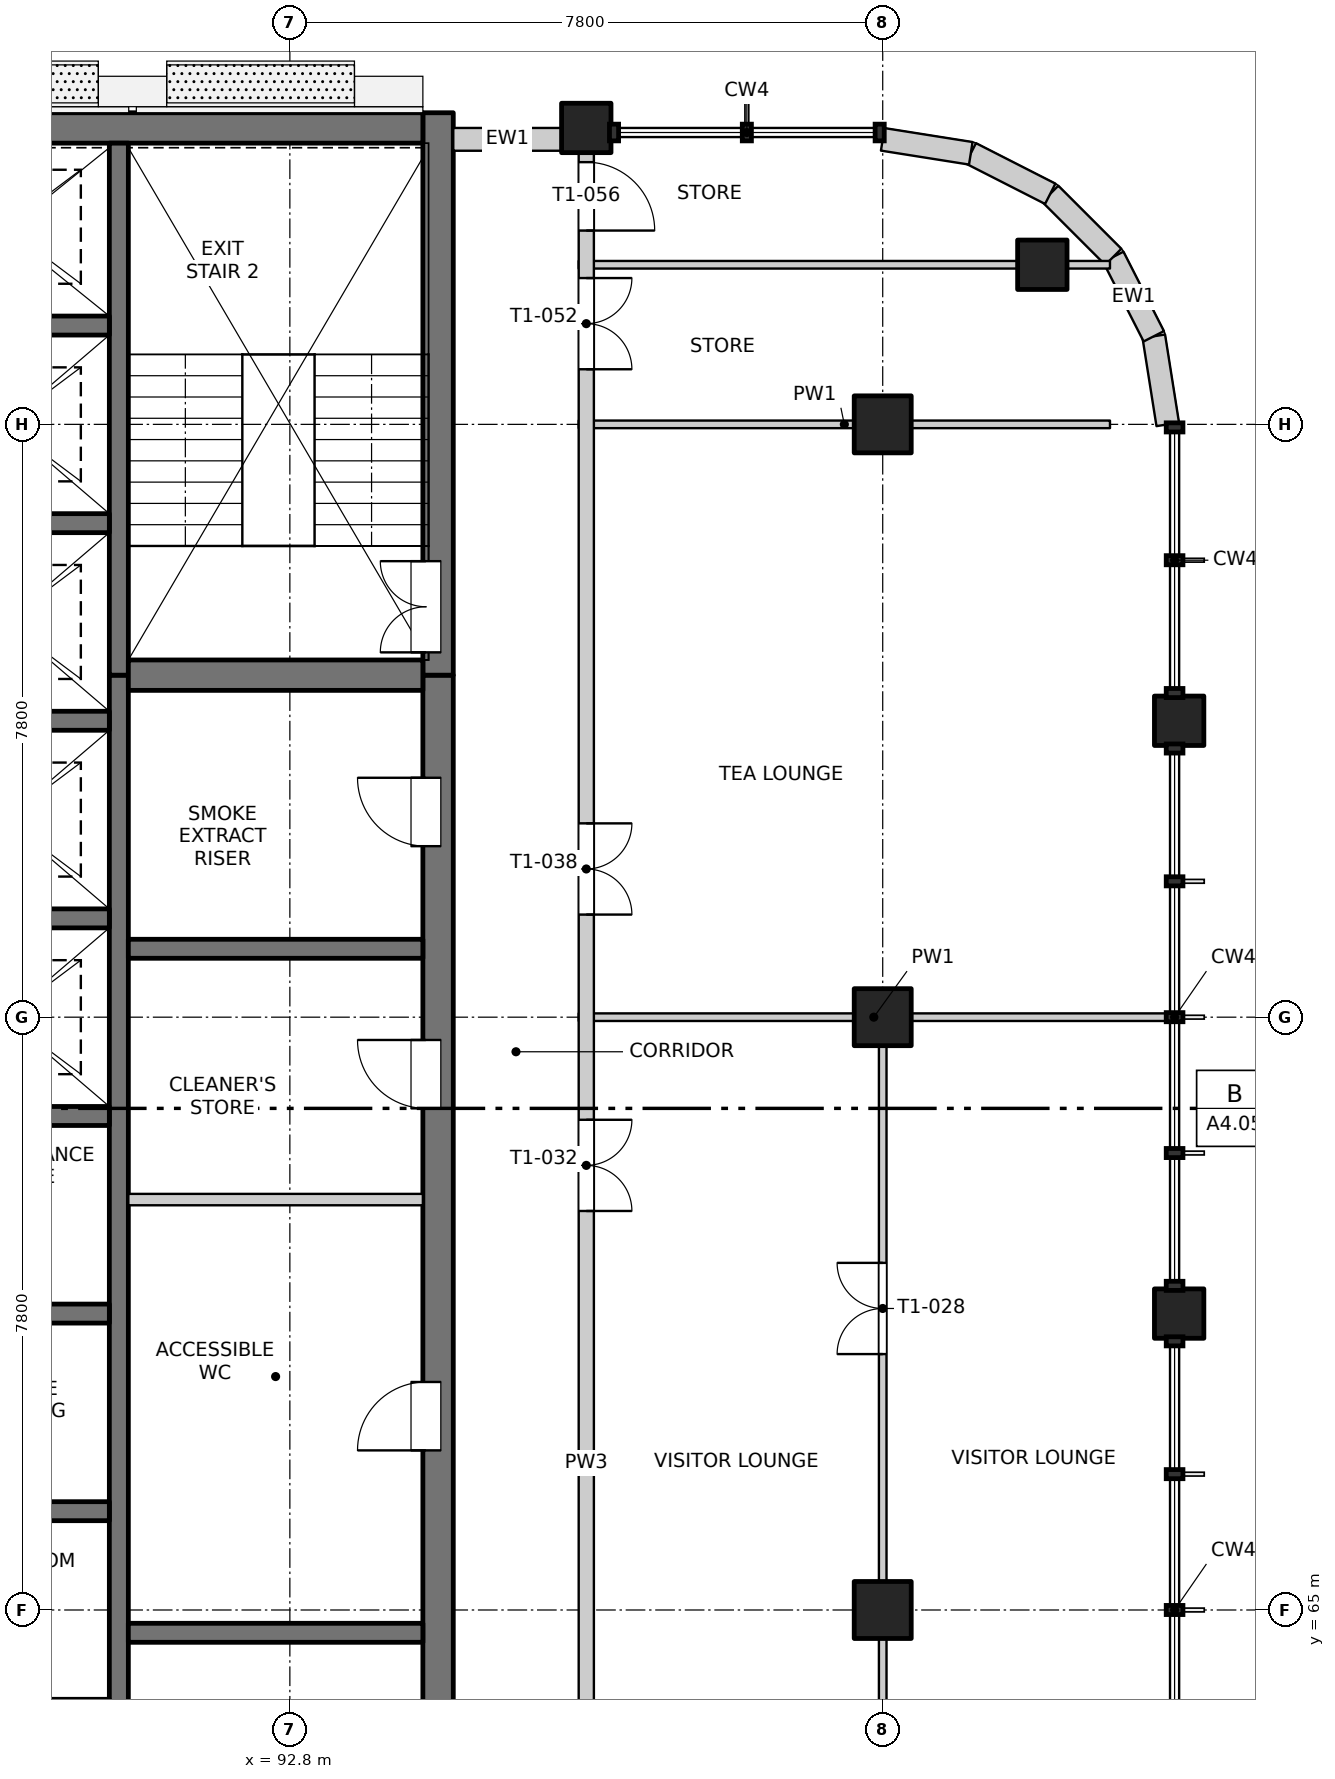
"""IFC4 building model, lengths in metres.
Left out: names, types, materials, properties, quantities, classifications, styles, units other than length and angle.
Written with IfcOpenShell. Run it as: python <this file> out.ifc"""

import sys

from ifc_helpers import new_model, si_unit, direction, frame, frame_2d, origin, origin_2d, place, context, subcontext, project, spatial, rectangle, extrude, element, fill, save


model = new_model("IFC4")
c1 = context("Model", 3, precision=1e-05, world=origin(), true_north=direction((0.0, 1.0)))
c2 = subcontext(c1, "Body", "Model", "MODEL_VIEW")
j1 = project(units=[si_unit("LENGTHUNIT", "METRE"), si_unit("PLANEANGLEUNIT", "RADIAN")], contexts=[c1])
p1 = place(None, origin())
s1 = spatial("IfcSite", under=j1, at=p1, CompositionType="ELEMENT")
p2 = place(p1, origin())
s2 = spatial("IfcBuilding", under=s1, at=p2, CompositionType="ELEMENT")
p3 = place(p2, frame((0.0, 0.0, 263.0)))
s3 = spatial("IfcBuildingStorey", under=s2, at=p3, CompositionType="ELEMENT", Elevation=263.0)
for number, where, z_axis, x_axis in (
    (1, (102.7, 82.7, -0.25), (0.0, 0.0, 1.0), (1.0, 0.0, 0.0)),
    (2, (104.5, 68.9, -0.25), (0.0, 0.0, 1.0), (1.0, 0.0, 0.0)),
    (3, (104.5, 76.7, -0.25), (0.0, 0.0, 1.0), (1.0, 0.0, 0.0)),
    (4, (96.7, 84.5, -0.25), (0.0, 0.0, 1.0), (1.0, 0.0, 0.0)),
):
    element("IfcColumn", number, at=place(p3, frame(where, z_axis=z_axis, x_axis=x_axis)), inside=s3, PredefinedType="COLUMN", context=c2, shape_type="SweptSolid", body=[
        extrude(rectangle(XDim=0.65, YDim=0.65, at=origin_2d()), origin(), (0.0, 0.0, 1.0), 3.35),
    ])
for number, where, z_axis, x_axis in (
    (5, (100.6, 65.0, -0.25), (0.0, 0.0, 1.0), (1.0, 0.0, 0.0)),
    (6, (100.6, 72.8, -0.25), (0.0, 0.0, 1.0), (1.0, 0.0, 0.0)),
    (7, (100.6, 80.6, -0.25), (0.0, 0.0, 1.0), (1.0, 0.0, 0.0)),
):
    element("IfcColumn", number, at=place(p3, frame(where, z_axis=z_axis, x_axis=x_axis)), inside=s3, PredefinedType="COLUMN", context=c2, shape_type="SweptSolid", body=[
        extrude(rectangle(XDim=0.75, YDim=0.75, at=origin_2d()), origin(), (0.0, 0.0, 1.0), 3.35),
    ])
p4 = place(p3, frame((94.75, 61.95, -0.25), z_axis=(0.0, 0.0, 1.0), x_axis=(0.0, 1.0, 0.0)))
e8 = element("IfcWall", 8, at=p4, inside=s3, PredefinedType="SOLIDWALL", context=c2, shape_type="SweptSolid", body=[
    extrude(rectangle(XDim=15.35, YDim=0.4, at=frame_2d((7.675, 0.0))), origin(), (0.0, 0.0, 1.0), 3.35),
])
p5 = place(p4, frame((0.925, 0.0, 0.25)))
e9 = element("IfcOpeningElement", 9, at=p5, cuts=e8, PredefinedType="OPENING", context=c2, shape_type="SweptSolid", body=[
    extrude(rectangle(XDim=0.9, YDim=2.1, at=frame_2d((0.45, 1.05))), frame((0.0, 0.21, 0.0), z_axis=(0.0, -1.0, 0.0), x_axis=(1.0, 0.0, 0.0)), (0.0, 0.0, 1.0), 0.42),
])
p6 = place(p4, frame((5.15, 0.0, 0.25)))
e10 = element("IfcOpeningElement", 10, at=p6, cuts=e8, PredefinedType="OPENING", context=c2, shape_type="SweptSolid", body=[
    extrude(rectangle(XDim=0.9, YDim=2.1, at=frame_2d((0.45, 1.05))), frame((0.0, 0.21, 0.0), z_axis=(0.0, -1.0, 0.0), x_axis=(1.0, 0.0, 0.0)), (0.0, 0.0, 1.0), 0.42),
])
p7 = place(p4, frame((9.65, 0.0, 0.25)))
e11 = element("IfcOpeningElement", 11, at=p7, cuts=e8, PredefinedType="OPENING", context=c2, shape_type="SweptSolid", body=[
    extrude(rectangle(XDim=0.9, YDim=2.1, at=frame_2d((0.45, 1.05))), frame((0.0, 0.21, 0.0), z_axis=(0.0, -1.0, 0.0), x_axis=(1.0, 0.0, 0.0)), (0.0, 0.0, 1.0), 0.42),
])
p8 = place(p4, frame((13.1, 0.0, 0.25)))
e12 = element("IfcOpeningElement", 12, at=p8, cuts=e8, PredefinedType="OPENING", context=c2, shape_type="SweptSolid", body=[
    extrude(rectangle(XDim=0.9, YDim=2.1, at=frame_2d((0.45, 1.05))), frame((0.0, 0.21, 0.0), z_axis=(0.0, -1.0, 0.0), x_axis=(1.0, 0.0, 0.0)), (0.0, 0.0, 1.0), 0.42),
])
p9 = place(p3, frame((94.75, 77.3, -0.25), z_axis=(0.0, 0.0, 1.0), x_axis=(0.0, 1.0, 0.0)))
e13 = element("IfcWall", 13, at=p9, inside=s3, PredefinedType="SOLIDWALL", context=c2, shape_type="SweptSolid", body=[
    extrude(rectangle(XDim=7.4, YDim=0.4, at=frame_2d((3.7, 0.0))), origin(), (0.0, 0.0, 1.0), 3.35),
])
p10 = place(p9, frame((0.3, 0.0, 0.25)))
e14 = element("IfcOpeningElement", 14, at=p10, cuts=e13, PredefinedType="OPENING", context=c2, shape_type="SweptSolid", body=[
    extrude(rectangle(XDim=1.2, YDim=2.1, at=frame_2d((0.6, 1.05))), frame((0.0, 0.21, 0.0), z_axis=(0.0, -1.0, 0.0), x_axis=(1.0, 0.0, 0.0)), (0.0, 0.0, 1.0), 0.42),
])
p11 = place(p3, frame((75.45, 84.5, -0.25), z_axis=(0.0, 0.0, 1.0), x_axis=(1.0, 0.0, 0.0)))
e15 = element("IfcWall", 15, at=p11, inside=s3, PredefinedType="SOLIDWALL", context=c2, shape_type="SweptSolid", body=[
    extrude(rectangle(XDim=19.1, YDim=0.4, at=frame_2d((9.55, 0.0))), origin(), (0.0, 0.0, 1.0), 3.35),
])
p12 = place(p3, frame((90.55, 61.95, -0.25), z_axis=(0.0, 0.0, 1.0), x_axis=(0.0, 1.0, 0.0)))
e16 = element("IfcWall", 16, at=p12, inside=s3, PredefinedType="SOLIDWALL", context=c2, shape_type="SweptSolid", body=[
    extrude(rectangle(XDim=15.35, YDim=0.25, at=frame_2d((7.675, 0.0))), origin(), (0.0, 0.0, 1.0), 3.35),
])
p13 = place(p3, frame((90.55, 77.3, -0.25), z_axis=(0.0, 0.0, 1.0), x_axis=(0.0, 1.0, 0.0)))
e17 = element("IfcWall", 17, at=p13, inside=s3, PredefinedType="SOLIDWALL", context=c2, shape_type="SweptSolid", body=[
    extrude(rectangle(XDim=7.0, YDim=0.25, at=frame_2d((3.5, 0.0))), origin(), (0.0, 0.0, 1.0), 3.35),
])
for number, where, z_axis, x_axis in (
    (18, (87.425, 66.3, -0.25), (0.0, 0.0, 1.0), (1.0, 0.0, 0.0)),
    (19, (87.425, 68.9, -0.25), (0.0, 0.0, 1.0), (1.0, 0.0, 0.0)),
    (20, (87.425, 71.5, -0.25), (0.0, 0.0, 1.0), (1.0, 0.0, 0.0)),
    (21, (87.425, 74.1, -0.25), (0.0, 0.0, 1.0), (1.0, 0.0, 0.0)),
    (22, (87.425, 76.7, -0.25), (0.0, 0.0, 1.0), (1.0, 0.0, 0.0)),
    (23, (87.425, 79.3, -0.25), (0.0, 0.0, 1.0), (1.0, 0.0, 0.0)),
    (24, (87.425, 81.9, -0.25), (0.0, 0.0, 1.0), (1.0, 0.0, 0.0)),
):
    element("IfcWall", number, at=place(p3, frame(where, z_axis=z_axis, x_axis=x_axis)), inside=s3, PredefinedType="SOLIDWALL", context=c2, shape_type="SweptSolid", body=[
        extrude(rectangle(XDim=3.0, YDim=0.25, at=frame_2d((1.5, 0.0))), origin(), (0.0, 0.0, 1.0), 3.35),
    ])
for number, where, z_axis, x_axis in (
    (25, (90.675, 64.7, -0.25), (0.0, 0.0, 1.0), (1.0, 0.0, 0.0)),
    (26, (90.675, 73.7, -0.25), (0.0, 0.0, 1.0), (1.0, 0.0, 0.0)),
):
    element("IfcWall", number, at=place(p3, frame(where, z_axis=z_axis, x_axis=x_axis)), inside=s3, PredefinedType="SOLIDWALL", context=c2, shape_type="SweptSolid", body=[
        extrude(rectangle(XDim=3.875, YDim=0.25, at=frame_2d((1.938, 0.0))), origin(), (0.0, 0.0, 1.0), 3.35),
    ])
p14 = place(p3, frame((90.675, 77.3, -0.25), z_axis=(0.0, 0.0, 1.0), x_axis=(1.0, 0.0, 0.0)))
e27 = element("IfcWall", 27, at=p14, inside=s3, PredefinedType="SOLIDWALL", context=c2, shape_type="SweptSolid", body=[
    extrude(rectangle(XDim=3.875, YDim=0.4, at=frame_2d((1.938, 0.0))), origin(), (0.0, 0.0, 1.0), 3.35),
])
p15 = place(p3, frame((94.95, 84.35, 0.0), z_axis=(0.0, 0.0, 1.0), x_axis=(1.0, 0.0, 0.0)))
e28 = element("IfcWall", 28, at=p15, inside=s3, PredefinedType="SOLIDWALL", context=c2, shape_type="SweptSolid", body=[
    extrude(rectangle(XDim=1.425, YDim=0.3, at=frame_2d((0.712, 0.0))), origin(), (0.0, 0.0, 1.0), 3.1),
])
p16 = place(p3, frame((104.35, 80.6, 0.0), z_axis=(0.0, 0.0, 1.0), x_axis=(-0.156496880861, 0.987678452879, 0.0)))
e29 = element("IfcWall", 29, at=p16, inside=s3, PredefinedType="SOLIDWALL", context=c2, shape_type="SweptSolid", body=[
    extrude(rectangle(XDim=1.173, YDim=0.3, at=frame_2d((0.586, 0.0))), origin(), (0.0, 0.0, 1.0), 3.1),
])
p17 = place(p3, frame((104.167, 81.759, 0.0), z_axis=(0.0, 0.0, 1.0), x_axis=(-0.454025524128, 0.890988677504, 0.0)))
e30 = element("IfcWall", 30, at=p17, inside=s3, PredefinedType="SOLIDWALL", context=c2, shape_type="SweptSolid", body=[
    extrude(rectangle(XDim=1.173, YDim=0.3, at=frame_2d((0.587, 0.0))), origin(), (0.0, 0.0, 1.0), 3.1),
])
p18 = place(p3, frame((103.634, 82.804, 0.0), z_axis=(0.0, 0.0, 1.0), x_axis=(-0.707106781187, 0.707106781187, 0.0)))
e31 = element("IfcWall", 31, at=p18, inside=s3, PredefinedType="SOLIDWALL", context=c2, shape_type="SweptSolid", body=[
    extrude(rectangle(XDim=1.173, YDim=0.3, at=frame_2d((0.586, 0.0))), origin(), (0.0, 0.0, 1.0), 3.1),
])
p19 = place(p3, frame((102.804, 83.634, 0.0), z_axis=(0.0, 0.0, 1.0), x_axis=(-0.890988677504, 0.454025524128, 0.0)))
e32 = element("IfcWall", 32, at=p19, inside=s3, PredefinedType="SOLIDWALL", context=c2, shape_type="SweptSolid", body=[
    extrude(rectangle(XDim=1.173, YDim=0.3, at=frame_2d((0.587, 0.0))), origin(), (0.0, 0.0, 1.0), 3.1),
])
p20 = place(p3, frame((101.759, 84.167, 0.0), z_axis=(0.0, 0.0, 1.0), x_axis=(-0.987678452879, 0.156496880861, 0.0)))
e33 = element("IfcWall", 33, at=p20, inside=s3, PredefinedType="SOLIDWALL", context=c2, shape_type="SweptSolid", body=[
    extrude(rectangle(XDim=1.173, YDim=0.3, at=frame_2d((0.586, 0.0))), origin(), (0.0, 0.0, 1.0), 3.1),
])
p21 = place(p3, frame((90.675, 70.4, 0.0), z_axis=(0.0, 0.0, 1.0), x_axis=(1.0, 0.0, 0.0)))
e34 = element("IfcWall", 34, at=p21, inside=s3, PredefinedType="PARTITIONING", context=c2, shape_type="SweptSolid", body=[
    extrude(rectangle(XDim=3.875, YDim=0.15, at=frame_2d((1.938, 0.0))), origin(), (0.0, 0.0, 1.0), 3.1),
])
p22 = place(p3, frame((96.6, 72.8, 0.0), z_axis=(0.0, 0.0, 1.0), x_axis=(1.0, 0.0, 0.0)))
e35 = element("IfcWall", 35, at=p22, inside=s3, PredefinedType="PARTITIONING", context=c2, shape_type="SweptSolid", body=[
    extrude(rectangle(XDim=7.765, YDim=0.1, at=frame_2d((3.882, 0.0))), origin(), (0.0, 0.0, 1.0), 3.1),
])
for number, where, z_axis, x_axis in (
    (36, (96.6, 80.6, 0.0), (0.0, 0.0, 1.0), (1.0, 0.0, 0.0)),
    (37, (96.6, 82.7, 0.0), (0.0, 0.0, 1.0), (1.0, 0.0, 0.0)),
):
    element("IfcWall", number, at=place(p3, frame(where, z_axis=z_axis, x_axis=x_axis)), inside=s3, PredefinedType="PARTITIONING", context=c2, shape_type="SweptSolid", body=[
        extrude(rectangle(XDim=6.99, YDim=0.1, at=frame_2d((3.495, 0.0))), origin(), (0.0, 0.0, 1.0), 3.1),
    ])
p23 = place(p3, frame((96.7, 49.5, 0.0), z_axis=(0.0, 0.0, 1.0), x_axis=(0.0, 1.0, 0.0)))
e38 = element("IfcWall", 38, at=p23, inside=s3, PredefinedType="PARTITIONING", context=c2, shape_type="SweptSolid", body=[
    extrude(rectangle(XDim=34.865, YDim=0.2, at=frame_2d((17.433, 0.0))), origin(), (0.0, 0.0, 1.0), 3.1),
])
p24 = place(p23, frame((9.05, 0.0, 0.0)))
e39 = element("IfcOpeningElement", 39, at=p24, cuts=e38, PredefinedType="OPENING", context=c2, shape_type="SweptSolid", body=[
    extrude(rectangle(XDim=1.2, YDim=2.1, at=frame_2d((0.6, 1.05))), frame((0.0, 0.11, 0.0), z_axis=(0.0, -1.0, 0.0), x_axis=(1.0, 0.0, 0.0)), (0.0, 0.0, 1.0), 0.22),
])
p25 = place(p23, frame((20.75, 0.0, 0.0)))
e40 = element("IfcOpeningElement", 40, at=p25, cuts=e38, PredefinedType="OPENING", context=c2, shape_type="SweptSolid", body=[
    extrude(rectangle(XDim=1.2, YDim=2.1, at=frame_2d((0.6, 1.05))), frame((0.0, 0.11, 0.0), z_axis=(0.0, -1.0, 0.0), x_axis=(1.0, 0.0, 0.0)), (0.0, 0.0, 1.0), 0.22),
])
p26 = place(p23, frame((24.65, 0.0, 0.0)))
e41 = element("IfcOpeningElement", 41, at=p26, cuts=e38, PredefinedType="OPENING", context=c2, shape_type="SweptSolid", body=[
    extrude(rectangle(XDim=1.2, YDim=2.1, at=frame_2d((0.6, 1.05))), frame((0.0, 0.11, 0.0), z_axis=(0.0, -1.0, 0.0), x_axis=(1.0, 0.0, 0.0)), (0.0, 0.0, 1.0), 0.22),
])
p27 = place(p23, frame((31.825, 0.0, 0.0)))
e42 = element("IfcOpeningElement", 42, at=p27, cuts=e38, PredefinedType="OPENING", context=c2, shape_type="SweptSolid", body=[
    extrude(rectangle(XDim=1.2, YDim=2.1, at=frame_2d((0.6, 1.05))), frame((0.0, 0.11, 0.0), z_axis=(0.0, -1.0, 0.0), x_axis=(1.0, 0.0, 0.0)), (0.0, 0.0, 1.0), 0.22),
])
p28 = place(p23, frame((33.65, 0.0, 0.0)))
e43 = element("IfcOpeningElement", 43, at=p28, cuts=e38, PredefinedType="OPENING", context=c2, shape_type="SweptSolid", body=[
    extrude(rectangle(XDim=0.9, YDim=2.1, at=frame_2d((0.45, 1.05))), frame((0.0, 0.11, 0.0), z_axis=(0.0, -1.0, 0.0), x_axis=(1.0, 0.0, 0.0)), (0.0, 0.0, 1.0), 0.22),
])
p29 = place(p3, frame((100.6, 47.35, 0.0), z_axis=(0.0, 0.0, 1.0), x_axis=(0.0, 1.0, 0.0)))
e44 = element("IfcWall", 44, at=p29, inside=s3, PredefinedType="PARTITIONING", context=c2, shape_type="SweptSolid", body=[
    extrude(rectangle(XDim=25.4, YDim=0.1, at=frame_2d((12.7, 0.0))), origin(), (0.0, 0.0, 1.0), 3.1),
])
p30 = place(p29, frame((5.35, 0.0, 0.0)))
e45 = element("IfcOpeningElement", 45, at=p30, cuts=e44, PredefinedType="OPENING", context=c2, shape_type="SweptSolid", body=[
    extrude(rectangle(XDim=1.2, YDim=2.1, at=frame_2d((0.6, 1.05))), frame((0.0, 0.06, 0.0), z_axis=(0.0, -1.0, 0.0), x_axis=(1.0, 0.0, 0.0)), (0.0, 0.0, 1.0), 0.12),
])
p31 = place(p29, frame((21.017, 0.0, 0.0)))
e46 = element("IfcOpeningElement", 46, at=p31, cuts=e44, PredefinedType="OPENING", context=c2, shape_type="SweptSolid", body=[
    extrude(rectangle(XDim=1.2, YDim=2.1, at=frame_2d((0.6, 1.05))), frame((0.0, 0.06, 0.0), z_axis=(0.0, -1.0, 0.0), x_axis=(1.0, 0.0, 0.0)), (0.0, 0.0, 1.0), 0.12),
])
p32 = place(p6, origin())
e47 = element("IfcDoor", 47, at=p32, inside=s3, OperationType="SINGLE_SWING_LEFT", PredefinedType="DOOR", context=c2, shape_type="SweptSolid", body=[
    extrude(rectangle(XDim=0.9, YDim=2.1, at=frame_2d((0.45, 1.05))), frame((0.0, 0.185, 0.0), z_axis=(0.0, -1.0, 0.0), x_axis=(1.0, 0.0, 0.0)), (0.0, 0.0, 1.0), 0.05),
])
fill(e10, e47)
p33 = place(p31, origin())
e48 = element("IfcDoor", 48, at=p33, inside=s3, OperationType="DOUBLE_DOOR_SINGLE_SWING", PredefinedType="DOOR", context=c2, shape_type="SweptSolid", body=[
    extrude(rectangle(XDim=1.2, YDim=2.1, at=frame_2d((0.6, 1.05))), frame((0.0, 0.025, 0.0), z_axis=(0.0, -1.0, 0.0), x_axis=(1.0, 0.0, 0.0)), (0.0, 0.0, 1.0), 0.05),
])
fill(e46, e48)
p34 = place(p25, origin())
e49 = element("IfcDoor", 49, at=p34, inside=s3, OperationType="DOUBLE_DOOR_SINGLE_SWING", PredefinedType="DOOR", context=c2, shape_type="SweptSolid", body=[
    extrude(rectangle(XDim=1.2, YDim=2.1, at=frame_2d((0.6, 1.05))), frame((0.0, 0.025, 0.0), z_axis=(0.0, -1.0, 0.0), x_axis=(1.0, 0.0, 0.0)), (0.0, 0.0, 1.0), 0.05),
])
fill(e40, e49)
p35 = place(p7, origin())
e50 = element("IfcDoor", 50, at=p35, inside=s3, OperationType="SINGLE_SWING_RIGHT", PredefinedType="DOOR", context=c2, shape_type="SweptSolid", body=[
    extrude(rectangle(XDim=0.9, YDim=2.1, at=frame_2d((0.45, 1.05))), frame((0.0, 0.185, 0.0), z_axis=(0.0, -1.0, 0.0), x_axis=(1.0, 0.0, 0.0)), (0.0, 0.0, 1.0), 0.05),
])
fill(e11, e50)
p36 = place(p26, origin())
e51 = element("IfcDoor", 51, at=p36, inside=s3, OperationType="DOUBLE_DOOR_SINGLE_SWING", PredefinedType="DOOR", context=c2, shape_type="SweptSolid", body=[
    extrude(rectangle(XDim=1.2, YDim=2.1, at=frame_2d((0.6, 1.05))), frame((0.0, 0.025, 0.0), z_axis=(0.0, -1.0, 0.0), x_axis=(1.0, 0.0, 0.0)), (0.0, 0.0, 1.0), 0.05),
])
fill(e41, e51)
p37 = place(p8, origin())
e52 = element("IfcDoor", 52, at=p37, inside=s3, OperationType="SINGLE_SWING_RIGHT", PredefinedType="DOOR", context=c2, shape_type="SweptSolid", body=[
    extrude(rectangle(XDim=0.9, YDim=2.1, at=frame_2d((0.45, 1.05))), frame((0.0, 0.185, 0.0), z_axis=(0.0, -1.0, 0.0), x_axis=(1.0, 0.0, 0.0)), (0.0, 0.0, 1.0), 0.05),
])
fill(e12, e52)
p38 = place(p10, origin())
e53 = element("IfcDoor", 53, at=p38, inside=s3, OperationType="DOUBLE_DOOR_SINGLE_SWING", PredefinedType="DOOR", context=c2, shape_type="SweptSolid", body=[
    extrude(rectangle(XDim=1.2, YDim=2.1, at=frame_2d((0.6, 1.05))), frame((0.0, 0.185, 0.0), z_axis=(0.0, -1.0, 0.0), x_axis=(1.0, 0.0, 0.0)), (0.0, 0.0, 1.0), 0.05),
])
fill(e14, e53)
p39 = place(p27, origin())
e54 = element("IfcDoor", 54, at=p39, inside=s3, OperationType="DOUBLE_DOOR_SINGLE_SWING", PredefinedType="DOOR", context=c2, shape_type="SweptSolid", body=[
    extrude(rectangle(XDim=1.2, YDim=2.1, at=frame_2d((0.6, 1.05))), frame((0.0, 0.025, 0.0), z_axis=(0.0, -1.0, 0.0), x_axis=(1.0, 0.0, 0.0)), (0.0, 0.0, 1.0), 0.05),
])
fill(e42, e54)
p40 = place(p28, origin())
e55 = element("IfcDoor", 55, at=p40, inside=s3, OperationType="SINGLE_SWING_RIGHT", PredefinedType="DOOR", context=c2, shape_type="SweptSolid", body=[
    extrude(rectangle(XDim=0.9, YDim=2.1, at=frame_2d((0.45, 1.05))), frame((0.0, 0.025, 0.0), z_axis=(0.0, -1.0, 0.0), x_axis=(1.0, 0.0, 0.0)), (0.0, 0.0, 1.0), 0.05),
])
fill(e43, e55)
save(model, sys.argv[1])
